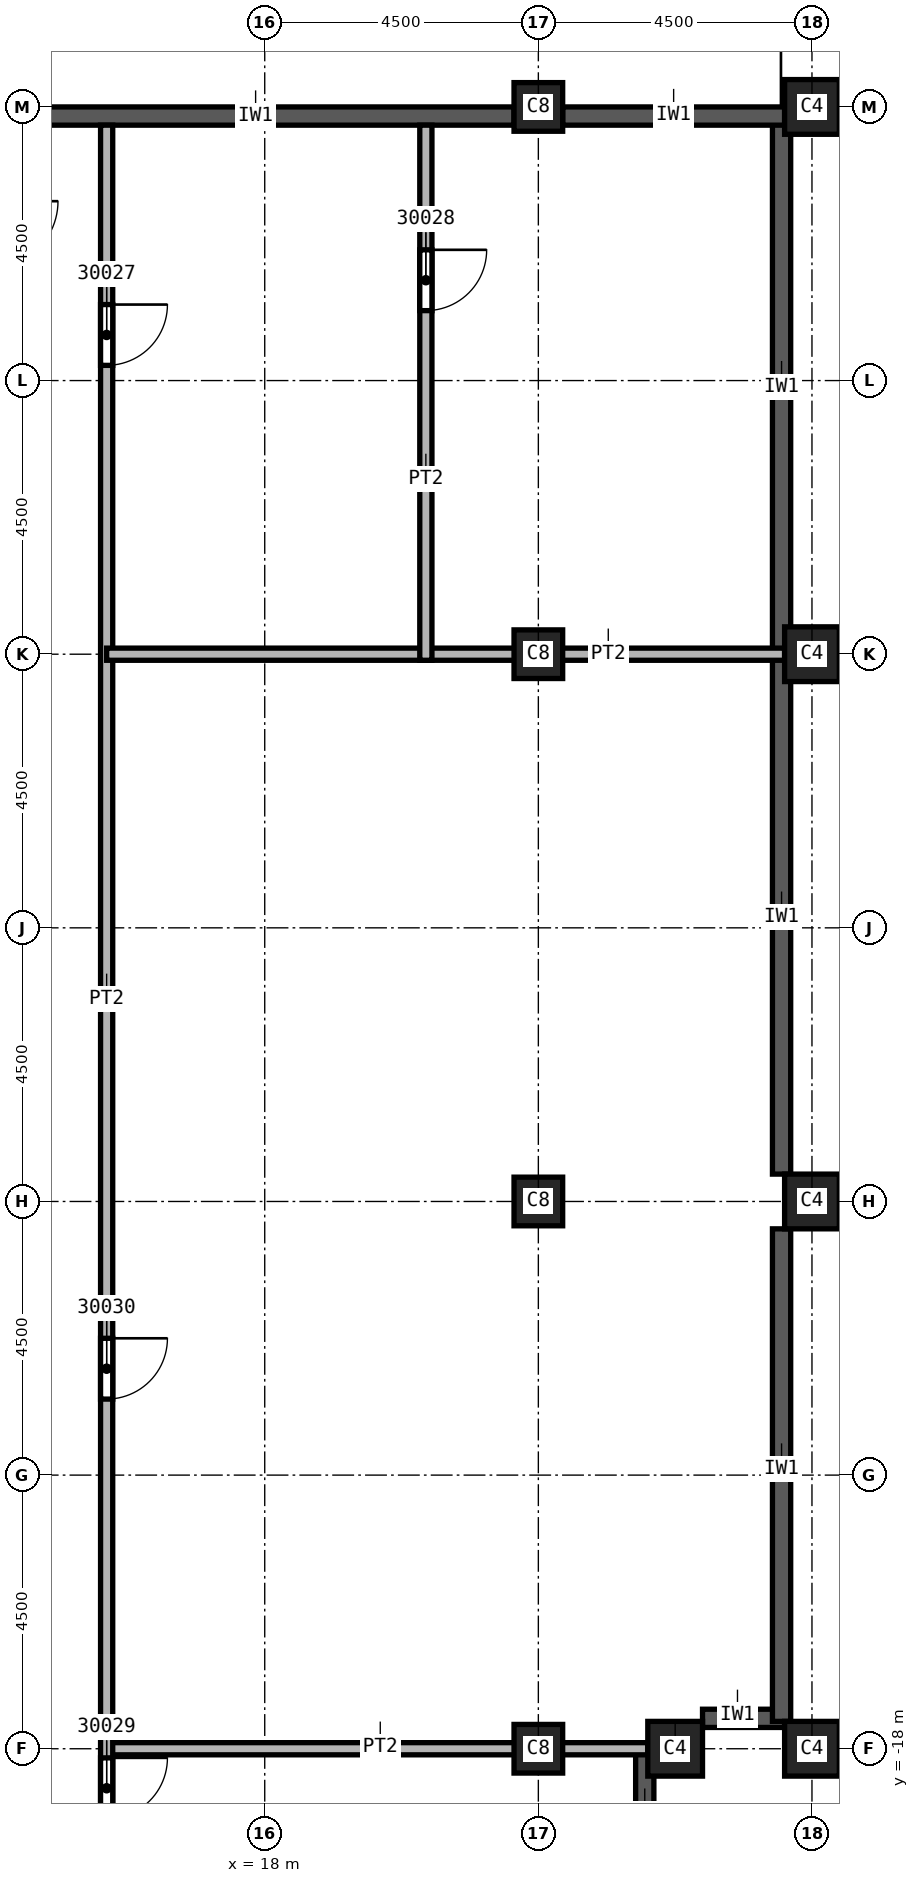
"""IFC4 building model, lengths in metres.
Left out: names, types, materials, properties, quantities, classifications, styles, units other than length and angle.
Written with IfcOpenShell. Run it as: python <this file> out.ifc"""

import sys

from ifc_helpers import new_model, si_unit, direction, frame, frame_2d, origin, origin_2d, place, context, subcontext, project, spatial, rectangle, extrude, element, fill, save


model = new_model("IFC4")
c1 = context("Model", 3, precision=1e-05, world=origin(), true_north=direction((0.0, 1.0)))
c2 = subcontext(c1, "Body", "Model", "MODEL_VIEW")
j1 = project(units=[si_unit("LENGTHUNIT", "METRE"), si_unit("PLANEANGLEUNIT", "RADIAN")], contexts=[c1])
p1 = place(None, origin())
s1 = spatial("IfcSite", under=j1, at=p1, CompositionType="ELEMENT")
p2 = place(p1, origin())
s2 = spatial("IfcBuilding", under=s1, at=p2, CompositionType="ELEMENT")
p3 = place(p2, frame((0.0, 0.0, 320.0)))
s3 = spatial("IfcBuildingStorey", under=s2, at=p3, CompositionType="ELEMENT", Elevation=320.0)
for number, where, z_axis, x_axis in (
    (1, (22.5, 0.0, 0.0), (0.0, 0.0, 1.0), (1.0, 0.0, 0.0)),
    (2, (22.5, 9.0, 0.0), (0.0, 0.0, 1.0), (1.0, 0.0, 0.0)),
    (3, (22.5, -9.0, 0.0), (0.0, 0.0, 1.0), (1.0, 0.0, 0.0)),
    (4, (22.5, -18.0, 0.0), (0.0, 0.0, 1.0), (1.0, 0.0, 0.0)),
):
    element("IfcColumn", number, at=place(p3, frame(where, z_axis=z_axis, x_axis=x_axis)), inside=s3, PredefinedType="COLUMN", context=c2, shape_type="SweptSolid", body=[
        extrude(rectangle(XDim=0.8, YDim=0.8, at=origin_2d()), origin(), (0.0, 0.0, 1.0), 5.74),
    ])
for number, where, z_axis, x_axis in (
    (5, (27.0, 0.0, 0.0), (0.0, 0.0, 1.0), (0.0, 1.0, 0.0)),
    (6, (27.0, 9.0, 0.0), (0.0, 0.0, 1.0), (0.0, 1.0, 0.0)),
    (7, (27.0, -9.0, 0.0), (0.0, 0.0, 1.0), (0.0, 1.0, 0.0)),
    (8, (27.0, -18.0, 0.0), (0.0, 0.0, 1.0), (0.0, 1.0, 0.0)),
    (9, (24.75, -18.0, 0.0), (0.0, 0.0, 1.0), (1.0, 0.0, 0.0)),
):
    element("IfcColumn", number, at=place(p3, frame(where, z_axis=z_axis, x_axis=x_axis)), inside=s3, PredefinedType="COLUMN", context=c2, shape_type="SweptSolid", body=[
        extrude(rectangle(XDim=0.9, YDim=0.9, at=origin_2d()), origin(), (0.0, 0.0, 1.0), 5.74),
    ])
p4 = place(p3, frame((24.25, -20.25, 0.0), z_axis=(0.0, 0.0, 1.0), x_axis=(0.0, 1.0, 0.0)))
e10 = element("IfcWall", 10, at=p4, inside=s3, PredefinedType="SOLIDWALL", context=c2, shape_type="SweptSolid", body=[
    extrude(rectangle(XDim=2.2, YDim=0.3, at=frame_2d((1.1, 0.0))), origin(), (0.0, 0.0, 1.0), 5.14),
])
p5 = place(p3, frame((25.2, -17.5, 0.0), z_axis=(0.0, 0.0, 1.0), x_axis=(1.0, 0.0, 0.0)))
e11 = element("IfcWall", 11, at=p5, inside=s3, PredefinedType="SOLIDWALL", context=c2, shape_type="SweptSolid", body=[
    extrude(rectangle(XDim=1.35, YDim=0.3, at=frame_2d((0.675, 0.0))), origin(), (0.0, 0.0, 1.0), 5.14),
])
p6 = place(p3, frame((26.5, -17.55, 0.0), z_axis=(0.0, 0.0, 1.0), x_axis=(0.0, 1.0, 0.0)))
e12 = element("IfcWall", 12, at=p6, inside=s3, PredefinedType="SOLIDWALL", context=c2, shape_type="SweptSolid", body=[
    extrude(rectangle(XDim=8.1, YDim=0.3, at=frame_2d((4.05, 0.0))), origin(), (0.0, 0.0, 1.0), 5.14),
])
p7 = place(p3, frame((26.5, -8.55, 0.0), z_axis=(0.0, 0.0, 1.0), x_axis=(0.0, 1.0, 0.0)))
e13 = element("IfcWall", 13, at=p7, inside=s3, PredefinedType="SOLIDWALL", context=c2, shape_type="SweptSolid", body=[
    extrude(rectangle(XDim=8.5, YDim=0.3, at=frame_2d((4.25, 0.0))), origin(), (0.0, 0.0, 1.0), 5.14),
])
p8 = place(p3, frame((26.5, 0.05, 0.0), z_axis=(0.0, 0.0, 1.0), x_axis=(0.0, 1.0, 0.0)))
e14 = element("IfcWall", 14, at=p8, inside=s3, PredefinedType="SOLIDWALL", context=c2, shape_type="SweptSolid", body=[
    extrude(rectangle(XDim=8.7, YDim=0.3, at=frame_2d((4.35, 0.0))), origin(), (0.0, 0.0, 1.0), 5.14),
])
p9 = place(p3, frame((22.1, 8.85, 0.0), z_axis=(0.0, 0.0, 1.0), x_axis=(-1.0, 0.0, 0.0)))
e15 = element("IfcWall", 15, at=p9, inside=s3, PredefinedType="SOLIDWALL", context=c2, shape_type="SweptSolid", body=[
    extrude(rectangle(XDim=8.55, YDim=0.3, at=frame_2d((4.275, 0.0))), origin(), (0.0, 0.0, 1.0), 5.14),
])
p10 = place(p3, frame((26.55, 8.85, 0.0), z_axis=(0.0, 0.0, 1.0), x_axis=(-1.0, 0.0, 0.0)))
e16 = element("IfcWall", 16, at=p10, inside=s3, PredefinedType="SOLIDWALL", context=c2, shape_type="SweptSolid", body=[
    extrude(rectangle(XDim=3.65, YDim=0.3, at=frame_2d((1.825, 0.0))), origin(), (0.0, 0.0, 1.0), 5.14),
])
p11 = place(p3, frame((15.4, -18.0, 0.0), z_axis=(0.0, 0.0, 1.0), x_axis=(1.0, 0.0, 0.0)))
e17 = element("IfcWall", 17, at=p11, inside=s3, PredefinedType="PARTITIONING", context=c2, shape_type="SweptSolid", body=[
    extrude(rectangle(XDim=8.9, YDim=0.2, at=frame_2d((4.45, 0.0))), origin(), (0.0, 0.0, 1.0), 5.74),
])
p12 = place(p3, frame((15.4, 8.7, 0.0), z_axis=(0.0, 0.0, 1.0), x_axis=(0.0, -1.0, 0.0)))
e18 = element("IfcWall", 18, at=p12, inside=s3, PredefinedType="PARTITIONING", context=c2, shape_type="SweptSolid", body=[
    extrude(rectangle(XDim=31.45, YDim=0.2, at=frame_2d((15.725, 0.0))), origin(), (0.0, 0.0, 1.0), 5.74),
])
p13 = place(p12, frame((2.95, 0.0, 0.0)))
e19 = element("IfcOpeningElement", 19, at=p13, cuts=e18, PredefinedType="OPENING", context=c2, shape_type="SweptSolid", body=[
    extrude(rectangle(XDim=1.0, YDim=2.1, at=frame_2d((0.5, 1.05))), frame((0.0, 0.1, 0.0), z_axis=(0.0, -1.0, 0.0), x_axis=(1.0, 0.0, 0.0)), (0.0, 0.0, 1.0), 0.2),
])
p14 = place(p12, frame((26.85, 0.0, 0.0)))
e20 = element("IfcOpeningElement", 20, at=p14, cuts=e18, PredefinedType="OPENING", context=c2, shape_type="SweptSolid", body=[
    extrude(rectangle(XDim=1.0, YDim=2.1, at=frame_2d((0.5, 1.05))), frame((0.0, 0.1, 0.0), z_axis=(0.0, -1.0, 0.0), x_axis=(1.0, 0.0, 0.0)), (0.0, 0.0, 1.0), 0.2),
])
p15 = place(p12, frame((19.95, 0.0, 0.0)))
e21 = element("IfcOpeningElement", 21, at=p15, cuts=e18, PredefinedType="OPENING", context=c2, shape_type="SweptSolid", body=[
    extrude(rectangle(XDim=1.0, YDim=2.1, at=frame_2d((0.5, 1.05))), frame((0.0, 0.1, 0.0), z_axis=(0.0, -1.0, 0.0), x_axis=(1.0, 0.0, 0.0)), (0.0, 0.0, 1.0), 0.2),
])
p16 = place(p3, frame((26.55, 0.0, 0.0), z_axis=(0.0, 0.0, 1.0), x_axis=(-1.0, 0.0, 0.0)))
e22 = element("IfcWall", 22, at=p16, inside=s3, PredefinedType="PARTITIONING", context=c2, shape_type="SweptSolid", body=[
    extrude(rectangle(XDim=11.15, YDim=0.2, at=frame_2d((5.575, 0.0))), origin(), (0.0, 0.0, 1.0), 5.74),
])
p17 = place(p3, frame((20.65, 8.7, 0.0), z_axis=(0.0, 0.0, 1.0), x_axis=(0.0, -1.0, 0.0)))
e23 = element("IfcWall", 23, at=p17, inside=s3, PredefinedType="PARTITIONING", context=c2, shape_type="SweptSolid", body=[
    extrude(rectangle(XDim=8.8, YDim=0.2, at=frame_2d((4.4, 0.0))), origin(), (0.0, 0.0, 1.0), 5.74),
])
p18 = place(p17, frame((2.05, 0.0, 0.0)))
e24 = element("IfcOpeningElement", 24, at=p18, cuts=e23, PredefinedType="OPENING", context=c2, shape_type="SweptSolid", body=[
    extrude(rectangle(XDim=1.0, YDim=2.1, at=frame_2d((0.5, 1.05))), frame((0.0, 0.1, 0.0), z_axis=(0.0, -1.0, 0.0), x_axis=(1.0, 0.0, 0.0)), (0.0, 0.0, 1.0), 0.2),
])
p19 = place(p13, origin())
e25 = element("IfcDoor", 25, at=p19, inside=s3, OperationType="SINGLE_SWING_RIGHT", PredefinedType="DOOR", context=c2, shape_type="SweptSolid", body=[
    extrude(rectangle(XDim=1.0, YDim=2.1, at=frame_2d((0.5, 1.05))), frame((0.0, 0.025, 0.0), z_axis=(0.0, -1.0, 0.0), x_axis=(1.0, 0.0, 0.0)), (0.0, 0.0, 1.0), 0.05),
])
fill(e19, e25)
p20 = place(p18, origin())
e26 = element("IfcDoor", 26, at=p20, inside=s3, OperationType="SINGLE_SWING_LEFT", PredefinedType="DOOR", context=c2, shape_type="SweptSolid", body=[
    extrude(rectangle(XDim=1.0, YDim=2.1, at=frame_2d((0.5, 1.05))), frame((0.0, 0.025, 0.0), z_axis=(0.0, -1.0, 0.0), x_axis=(1.0, 0.0, 0.0)), (0.0, 0.0, 1.0), 0.05),
])
fill(e24, e26)
p21 = place(p14, origin())
e27 = element("IfcDoor", 27, at=p21, inside=s3, OperationType="SINGLE_SWING_RIGHT", PredefinedType="DOOR", context=c2, shape_type="SweptSolid", body=[
    extrude(rectangle(XDim=1.0, YDim=2.1, at=frame_2d((0.5, 1.05))), frame((0.0, 0.025, 0.0), z_axis=(0.0, -1.0, 0.0), x_axis=(1.0, 0.0, 0.0)), (0.0, 0.0, 1.0), 0.05),
])
fill(e20, e27)
p22 = place(p15, origin())
e28 = element("IfcDoor", 28, at=p22, inside=s3, OperationType="SINGLE_SWING_LEFT", PredefinedType="DOOR", context=c2, shape_type="SweptSolid", body=[
    extrude(rectangle(XDim=1.0, YDim=2.1, at=frame_2d((0.5, 1.05))), frame((0.0, 0.025, 0.0), z_axis=(0.0, -1.0, 0.0), x_axis=(1.0, 0.0, 0.0)), (0.0, 0.0, 1.0), 0.05),
])
fill(e21, e28)
save(model, sys.argv[1])
